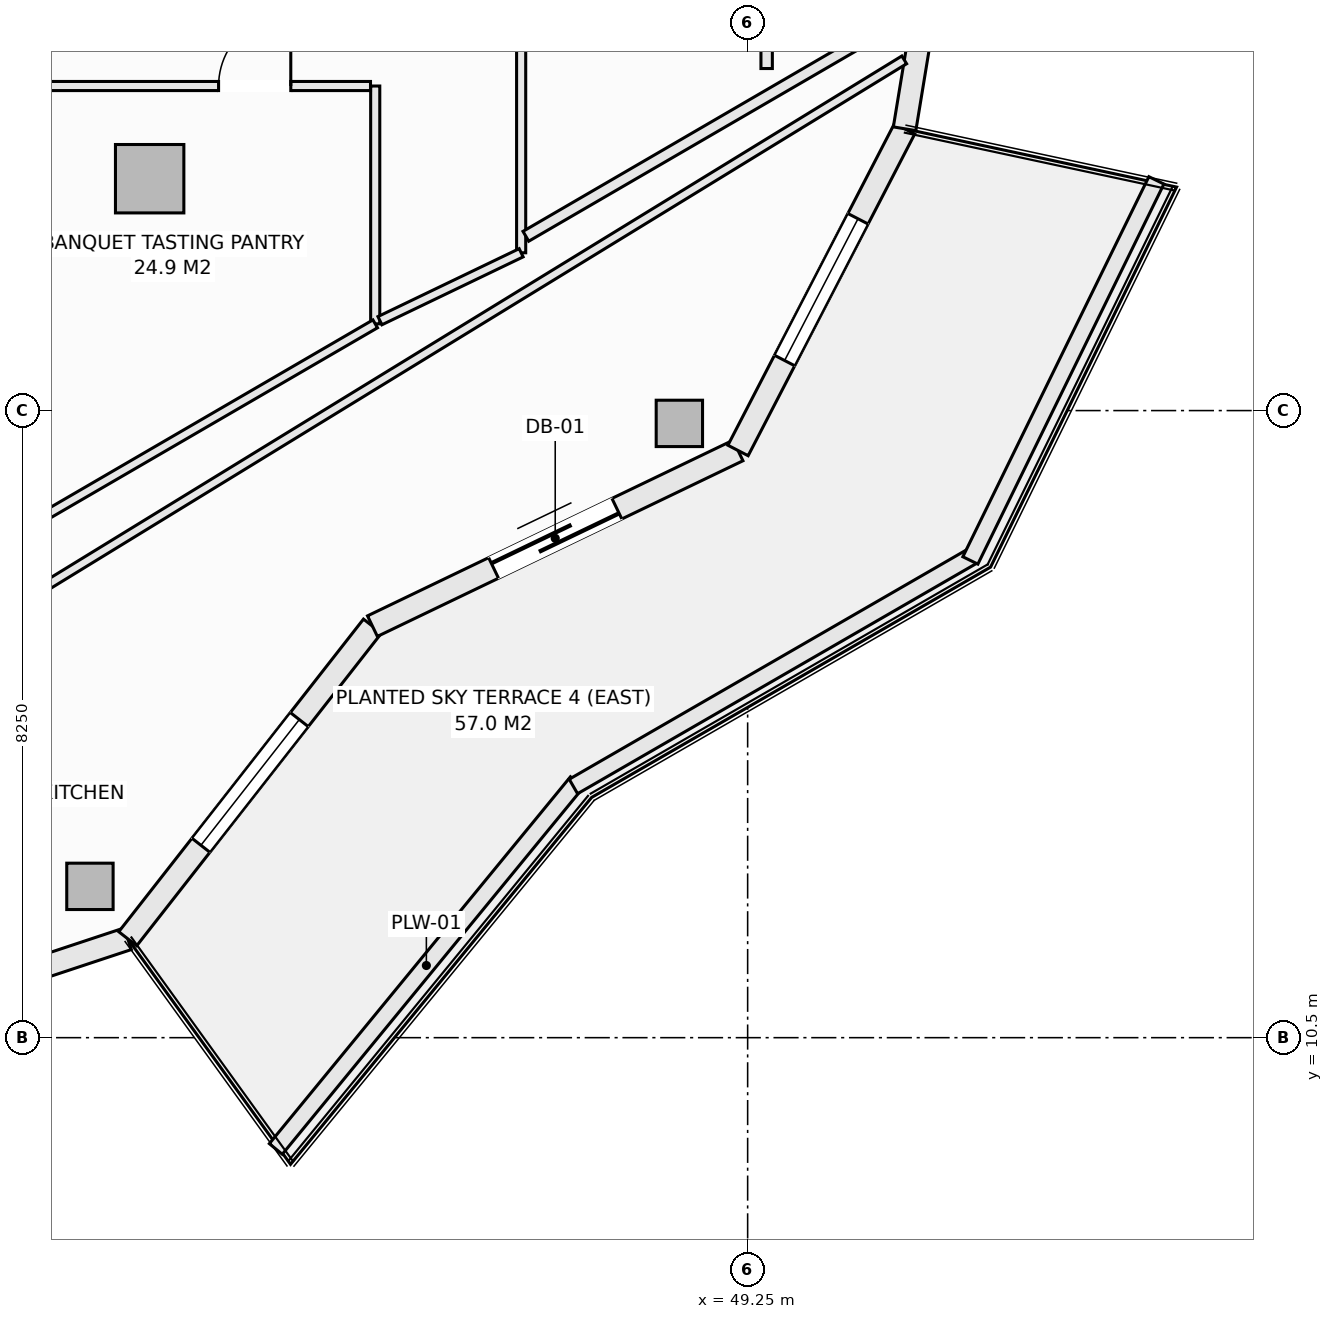
"""IFC4 building model, lengths in metres.
Left out: names, types, materials, properties, quantities, classifications, styles, units other than length and angle.
Written with IfcOpenShell. Run it as: python <this file> out.ifc"""

import sys

from ifc_helpers import new_model, si_unit, direction, frame, frame_2d, origin, origin_2d, place, context, subcontext, project, spatial, rectangle, hollow_rectangle, extrude, element, fill, save


model = new_model("IFC4")
c1 = context("Model", 3, precision=1e-05, world=origin(), true_north=direction((0.0, 1.0)))
c2 = subcontext(c1, "Body", "Model", "MODEL_VIEW")
j1 = project(units=[si_unit("LENGTHUNIT", "METRE"), si_unit("PLANEANGLEUNIT", "RADIAN")], contexts=[c1])
p1 = place(None, origin())
s1 = spatial("IfcSite", under=j1, at=p1, CompositionType="ELEMENT")
p2 = place(p1, origin())
s2 = spatial("IfcBuilding", under=s1, at=p2, CompositionType="ELEMENT")
p3 = place(p2, frame((0.0, 0.0, 149.5)))
s3 = spatial("IfcBuildingStorey", under=s2, at=p3, CompositionType="ELEMENT", Elevation=149.5)
for number, where, z_axis, x_axis in (
    (1, (40.596, 12.49, -0.27), (0.0, 0.0, 1.0), (1.0, 0.0, 0.0)),
    (2, (48.352, 18.581, -0.27), (0.0, 0.0, 1.0), (1.0, 0.0, 0.0)),
):
    element("IfcColumn", number, at=place(p3, frame(where, z_axis=z_axis, x_axis=x_axis)), inside=s3, PredefinedType="COLUMN", context=c2, shape_type="SweptSolid", body=[
        extrude(hollow_rectangle(XDim=0.61, YDim=0.61, WallThickness=0.025, at=origin_2d()), origin(), (0.0, 0.0, 1.0), 3.4),
    ])
p4 = place(p3, frame((41.382, 21.801, -0.27), z_axis=(0.0, 0.0, 1.0), x_axis=(1.0, 0.0, 0.0)))
e3 = element("IfcColumn", 3, at=p4, inside=s3, PredefinedType="COLUMN", context=c2, shape_type="SweptSolid", body=[
    extrude(rectangle(XDim=0.9, YDim=0.9, at=origin_2d()), origin(), (0.0, 0.0, 1.0), 3.4),
])
p5 = place(p3, frame((35.803, 10.048, 0.0), z_axis=(0.0, 0.0, 1.0), x_axis=(0.949246811547, 0.314532177636, 0.0)))
e4 = element("IfcWall", 4, at=p5, inside=s3, PredefinedType="SOLIDWALL", context=c2, shape_type="SweptSolid", body=[
    extrude(rectangle(XDim=5.574, YDim=0.3, at=frame_2d((2.787, 0.0))), origin(), (0.0, 0.0, 1.0), 2.653),
])
p6 = place(p5, frame((1.737, 0.0, 0.74)))
e5 = element("IfcOpeningElement", 5, at=p6, cuts=e4, PredefinedType="OPENING", context=c2, shape_type="SweptSolid", body=[
    extrude(rectangle(XDim=2.1, YDim=1.7, at=frame_2d((1.05, 0.85))), frame((0.0, 0.16, 0.0), z_axis=(0.0, -1.0, 0.0), x_axis=(1.0, 0.0, 0.0)), (0.0, 0.0, 1.0), 0.32),
])
p7 = place(p3, frame((41.094, 11.801, 0.0), z_axis=(0.0, 0.0, 1.0), x_axis=(0.616429245738, 0.787410302828, 0.0)))
e6 = element("IfcWall", 6, at=p7, inside=s3, PredefinedType="SOLIDWALL", context=c2, shape_type="SweptSolid", body=[
    extrude(rectangle(XDim=5.223, YDim=0.3, at=frame_2d((2.612, 0.0))), origin(), (0.0, 0.0, 1.0), 2.653),
])
p8 = place(p7, frame((1.562, 0.0, 0.74)))
e7 = element("IfcOpeningElement", 7, at=p8, cuts=e6, PredefinedType="OPENING", context=c2, shape_type="SweptSolid", body=[
    extrude(rectangle(XDim=2.1, YDim=1.7, at=frame_2d((1.05, 0.85))), frame((0.0, 0.16, 0.0), z_axis=(0.0, -1.0, 0.0), x_axis=(1.0, 0.0, 0.0)), (0.0, 0.0, 1.0), 0.32),
])
p9 = place(p3, frame((44.313, 15.914, 0.0), z_axis=(0.0, 0.0, 1.0), x_axis=(0.901353070301, 0.433085029363, 0.0)))
e8 = element("IfcWall", 8, at=p9, inside=s3, PredefinedType="SOLIDWALL", context=c2, shape_type="SweptSolid", body=[
    extrude(rectangle(XDim=5.336, YDim=0.3, at=frame_2d((2.668, 0.0))), origin(), (0.0, 0.0, 1.0), 2.653),
])
p10 = place(p9, frame((1.768, 0.0, 0.0)))
e9 = element("IfcOpeningElement", 9, at=p10, cuts=e8, PredefinedType="OPENING", context=c2, shape_type="SweptSolid", body=[
    extrude(rectangle(XDim=1.8, YDim=2.25, at=frame_2d((0.9, 1.125))), frame((0.0, 0.16, 0.0), z_axis=(0.0, -1.0, 0.0), x_axis=(1.0, 0.0, 0.0)), (0.0, 0.0, 1.0), 0.32),
])
p11 = place(p3, frame((49.123, 18.225, 0.0), z_axis=(0.0, 0.0, 1.0), x_axis=(0.459810251451, 0.888017191647, 0.0)))
e10 = element("IfcWall", 10, at=p11, inside=s3, PredefinedType="SOLIDWALL", context=c2, shape_type="SweptSolid", body=[
    extrude(rectangle(XDim=4.766, YDim=0.3, at=frame_2d((2.383, 0.0))), origin(), (0.0, 0.0, 1.0), 2.653),
])
p12 = place(p11, frame((1.333, 0.0, 0.74)))
e11 = element("IfcOpeningElement", 11, at=p12, cuts=e10, PredefinedType="OPENING", context=c2, shape_type="SweptSolid", body=[
    extrude(rectangle(XDim=2.1, YDim=1.7, at=frame_2d((1.05, 0.85))), frame((0.0, 0.16, 0.0), z_axis=(0.0, -1.0, 0.0), x_axis=(1.0, 0.0, 0.0)), (0.0, 0.0, 1.0), 0.32),
])
p13 = place(p3, frame((51.315, 22.458, 0.0), z_axis=(0.0, 0.0, 1.0), x_axis=(0.162394765401, 0.986725868806, 0.0)))
e12 = element("IfcWall", 12, at=p13, inside=s3, PredefinedType="SOLIDWALL", context=c2, shape_type="SweptSolid", body=[
    extrude(rectangle(XDim=4.603, YDim=0.3, at=frame_2d((2.302, 0.0))), origin(), (0.0, 0.0, 1.0), 2.653),
])
p14 = place(p13, frame((1.68, 0.0, 0.74)))
e13 = element("IfcOpeningElement", 13, at=p14, cuts=e12, PredefinedType="OPENING", context=c2, shape_type="SweptSolid", body=[
    extrude(rectangle(XDim=1.2, YDim=1.7, at=frame_2d((0.6, 0.85))), frame((0.0, 0.16, 0.0), z_axis=(0.0, -1.0, 0.0), x_axis=(1.0, 0.0, 0.0)), (0.0, 0.0, 1.0), 0.32),
])
p15 = place(p13, frame((3.48, 0.0, 0.72)))
e14 = element("IfcOpeningElement", 14, at=p15, cuts=e12, PredefinedType="OPENING", context=c2, shape_type="SweptSolid", body=[
    extrude(rectangle(XDim=0.9, YDim=1.65, at=frame_2d((0.45, 0.825))), frame((0.0, 0.16, 0.0), z_axis=(0.0, -1.0, 0.0), x_axis=(1.0, 0.0, 0.0)), (0.0, 0.0, 1.0), 0.32),
])
p16 = place(p3, frame((43.042, 9.036, 0.0), z_axis=(0.0, 0.0, 1.0), x_axis=(0.634429234628, 0.77298094818, 0.0)))
e15 = element("IfcWall", 15, at=p16, inside=s3, PredefinedType="PARAPET", context=c2, shape_type="SweptSolid", body=[
    extrude(rectangle(XDim=6.245, YDim=0.22, at=frame_2d((3.123, 0.0))), origin(), (0.0, 0.0, 1.0), 0.52),
])
p17 = place(p3, frame((46.958, 13.805, 0.0), z_axis=(0.0, 0.0, 1.0), x_axis=(0.866058128659, 0.499943314571, 0.0)))
e16 = element("IfcWall", 16, at=p17, inside=s3, PredefinedType="PARAPET", context=c2, shape_type="SweptSolid", body=[
    extrude(rectangle(XDim=6.06, YDim=0.22, at=frame_2d((3.03, 0.0))), origin(), (0.0, 0.0, 1.0), 0.52),
])
p18 = place(p3, frame((52.18, 16.779, 0.0), z_axis=(0.0, 0.0, 1.0), x_axis=(0.439637174641, 0.898175458735, 0.0)))
e17 = element("IfcWall", 17, at=p18, inside=s3, PredefinedType="PARAPET", context=c2, shape_type="SweptSolid", body=[
    extrude(rectangle(XDim=5.567, YDim=0.22, at=frame_2d((2.784, 0.0))), origin(), (0.0, 0.0, 1.0), 0.52),
])
p19 = place(p3, frame((44.35, 19.891, 0.0), z_axis=(0.0, 0.0, 1.0), x_axis=(0.0, 1.0, 0.0)))
e18 = element("IfcWall", 18, at=p19, inside=s3, PredefinedType="PARTITIONING", context=c2, shape_type="SweptSolid", body=[
    extrude(rectangle(XDim=3.129, YDim=0.12, at=frame_2d((1.564, 0.0))), origin(), (0.0, 0.0, 1.0), 3.13),
])
p20 = place(p3, frame((46.27, 20.826, 0.0), z_axis=(0.0, 0.0, 1.0), x_axis=(0.0, 1.0, 0.0)))
e19 = element("IfcWall", 19, at=p20, inside=s3, PredefinedType="PARTITIONING", context=c2, shape_type="SweptSolid", body=[
    extrude(rectangle(XDim=12.348, YDim=0.12, at=frame_2d((6.174, 0.0))), origin(), (0.0, 0.0, 1.0), 3.13),
])
p21 = place(p20, frame((3.556, 0.0, 0.0)))
e20 = element("IfcOpeningElement", 20, at=p21, cuts=e19, PredefinedType="OPENING", context=c2, shape_type="SweptSolid", body=[
    extrude(rectangle(XDim=0.95, YDim=2.1, at=frame_2d((0.475, 1.05))), frame((0.0, 0.07, 0.0), z_axis=(0.0, -1.0, 0.0), x_axis=(1.0, 0.0, 0.0)), (0.0, 0.0, 1.0), 0.14),
])
p22 = place(p20, frame((9.318, 0.0, 0.0)))
e21 = element("IfcOpeningElement", 21, at=p22, cuts=e19, PredefinedType="OPENING", context=c2, shape_type="SweptSolid", body=[
    extrude(rectangle(XDim=0.95, YDim=2.1, at=frame_2d((0.475, 1.05))), frame((0.0, 0.07, 0.0), z_axis=(0.0, -1.0, 0.0), x_axis=(1.0, 0.0, 0.0)), (0.0, 0.0, 1.0), 0.14),
])
p23 = place(p3, frame((44.412, 19.933, 0.0), z_axis=(0.0, 0.0, 1.0), x_axis=(0.90128266231, 0.433231534656, 0.0)))
e22 = element("IfcWall", 22, at=p23, inside=s3, PredefinedType="PARTITIONING", context=c2, shape_type="SweptSolid", body=[
    extrude(rectangle(XDim=2.062, YDim=0.12, at=frame_2d((1.031, 0.0))), origin(), (0.0, 0.0, 1.0), 3.13),
])
p24 = place(p3, frame((39.0, 23.02, 0.0), z_axis=(0.0, 0.0, 1.0), x_axis=(1.0, 0.0, 0.0)))
e23 = element("IfcWall", 23, at=p24, inside=s3, PredefinedType="PARTITIONING", context=c2, shape_type="SweptSolid", body=[
    extrude(rectangle(XDim=5.288, YDim=0.12, at=frame_2d((2.644, 0.0))), origin(), (0.0, 0.0, 1.0), 3.13),
])
p25 = place(p24, frame((3.289, 0.0, 0.0)))
e24 = element("IfcOpeningElement", 24, at=p25, cuts=e23, PredefinedType="OPENING", context=c2, shape_type="SweptSolid", body=[
    extrude(rectangle(XDim=0.95, YDim=2.1, at=frame_2d((0.475, 1.05))), frame((0.0, 0.07, 0.0), z_axis=(0.0, -1.0, 0.0), x_axis=(1.0, 0.0, 0.0)), (0.0, 0.0, 1.0), 0.14),
])
p26 = place(p3, frame((39.082, 15.87, 0.0), z_axis=(0.0, 0.0, 1.0), x_axis=(0.852607858044, 0.522551280165, 0.0)))
e25 = element("IfcWall", 25, at=p26, inside=s3, PredefinedType="PARTITIONING", context=c2, shape_type="SweptSolid", body=[
    extrude(rectangle(XDim=14.342, YDim=0.12, at=frame_2d((7.171, 0.0))), origin(), (0.0, 0.0, 1.0), 2.505),
])
p27 = place(p3, frame((39.082, 16.829, 0.0), z_axis=(0.0, 0.0, 1.0), x_axis=(0.864565483681, 0.502520173155, 0.0)))
e26 = element("IfcWall", 26, at=p27, inside=s3, PredefinedType="PARTITIONING", context=c2, shape_type="SweptSolid", body=[
    extrude(rectangle(XDim=6.093, YDim=0.12, at=frame_2d((3.047, 0.0))), origin(), (0.0, 0.0, 1.0), 2.505),
])
p28 = place(p3, frame((46.332, 21.043, 0.0), z_axis=(0.0, 0.0, 1.0), x_axis=(0.864559641837, 0.502530223674, 0.0)))
e27 = element("IfcWall", 27, at=p28, inside=s3, PredefinedType="PARTITIONING", context=c2, shape_type="SweptSolid", body=[
    extrude(rectangle(XDim=5.878, YDim=0.15, at=frame_2d((2.939, 0.0))), origin(), (0.0, 0.0, 1.0), 3.13),
])
p29 = place(p3, frame((49.5, 23.25, 0.0), z_axis=(0.0, 0.0, 1.0), x_axis=(0.0, 1.0, 0.0)))
e28 = element("IfcWall", 28, at=p29, inside=s3, PredefinedType="PARTITIONING", context=c2, shape_type="SweptSolid", body=[
    extrude(rectangle(XDim=2.473, YDim=0.15, at=frame_2d((1.236, 0.0))), origin(), (0.0, 0.0, 1.0), 3.13),
])
p30 = place(p29, frame((0.787, 0.0, 0.0)))
e29 = element("IfcOpeningElement", 29, at=p30, cuts=e28, PredefinedType="OPENING", context=c2, shape_type="SweptSolid", body=[
    extrude(rectangle(XDim=0.9, YDim=2.1, at=frame_2d((0.45, 1.05))), frame((0.0, 0.085, 0.0), z_axis=(0.0, -1.0, 0.0), x_axis=(1.0, 0.0, 0.0)), (0.0, 0.0, 1.0), 0.17),
])
p31 = place(p8, origin())
e30 = element("IfcWindow", 30, at=p31, inside=s3, PartitioningType="SINGLE_PANEL", PredefinedType="WINDOW", context=c2, shape_type="SweptSolid", body=[
    extrude(rectangle(XDim=2.1, YDim=1.7, at=frame_2d((1.05, 0.85))), frame((0.0, 0.03, 0.0), z_axis=(0.0, -1.0, 0.0), x_axis=(1.0, 0.0, 0.0)), (0.0, 0.0, 1.0), 0.06),
])
fill(e7, e30)
p32 = place(p10, frame((1.8, 0.0, 0.0), z_axis=(0.0, 0.0, 1.0), x_axis=(-1.0, 0.0, 0.0)))
e31 = element("IfcDoor", 31, at=p32, inside=s3, OperationType="SLIDING_TO_LEFT", PredefinedType="DOOR", context=c2, shape_type="SweptSolid", body=[
    extrude(rectangle(XDim=1.8, YDim=2.25, at=frame_2d((0.9, 1.125))), frame((0.0, 0.025, 0.0), z_axis=(0.0, -1.0, 0.0), x_axis=(1.0, 0.0, 0.0)), (0.0, 0.0, 1.0), 0.05),
])
fill(e9, e31)
p33 = place(p12, origin())
e32 = element("IfcWindow", 32, at=p33, inside=s3, PartitioningType="SINGLE_PANEL", PredefinedType="WINDOW", context=c2, shape_type="SweptSolid", body=[
    extrude(rectangle(XDim=2.1, YDim=1.7, at=frame_2d((1.05, 0.85))), frame((0.0, 0.03, 0.0), z_axis=(0.0, -1.0, 0.0), x_axis=(1.0, 0.0, 0.0)), (0.0, 0.0, 1.0), 0.06),
])
fill(e11, e32)
p34 = place(p25, origin())
e33 = element("IfcDoor", 33, at=p34, inside=s3, OperationType="SINGLE_SWING_RIGHT", PredefinedType="DOOR", context=c2, shape_type="SweptSolid", body=[
    extrude(rectangle(XDim=0.95, YDim=2.1, at=frame_2d((0.475, 1.05))), frame((0.0, 0.025, 0.0), z_axis=(0.0, -1.0, 0.0), x_axis=(1.0, 0.0, 0.0)), (0.0, 0.0, 1.0), 0.05),
])
fill(e24, e33)
save(model, sys.argv[1])
